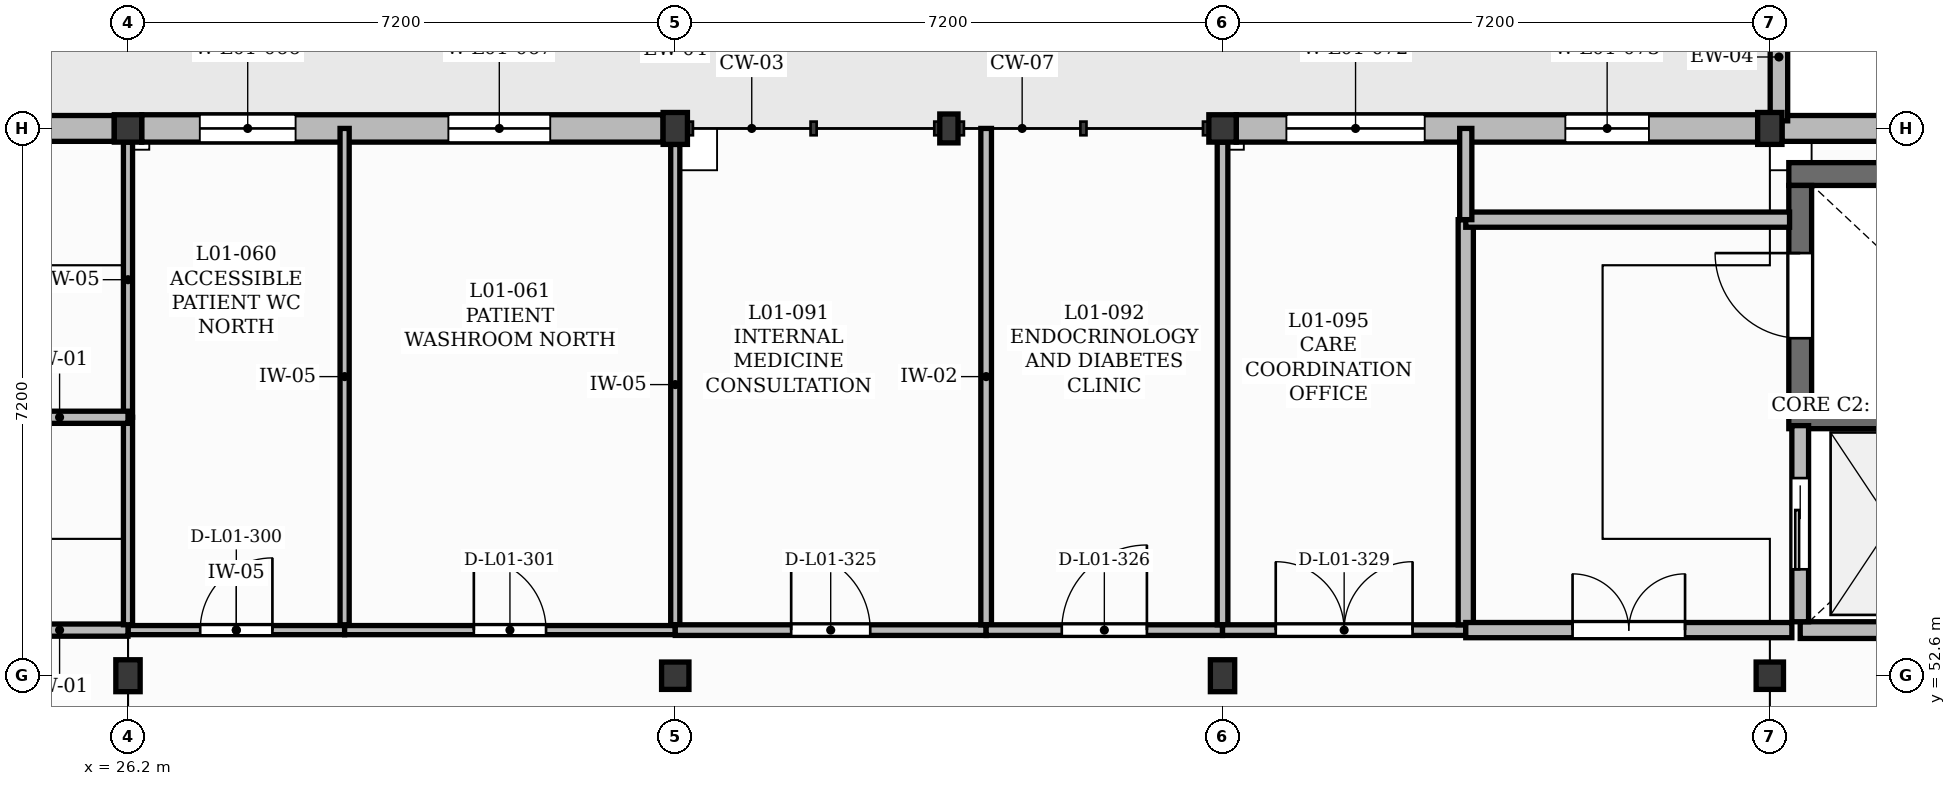
"""IFC4 building model, lengths in metres.
Left out: names, types, materials, properties, quantities, classifications, styles, units other than length and angle.
Written with IfcOpenShell. Run it as: python <this file> out.ifc"""

import sys

from ifc_helpers import new_model, si_unit, direction, frame, frame_2d, origin, origin_2d, place, context, subcontext, project, spatial, rectangle, extrude, element, fill, save


model = new_model("IFC4")
c1 = context("Model", 3, precision=1e-05, world=origin(), true_north=direction((0.0, 1.0)))
c2 = subcontext(c1, "Body", "Model", "MODEL_VIEW")
j1 = project(units=[si_unit("LENGTHUNIT", "METRE"), si_unit("PLANEANGLEUNIT", "RADIAN")], contexts=[c1])
p1 = place(None, origin())
s1 = spatial("IfcSite", under=j1, at=p1, CompositionType="ELEMENT")
p2 = place(p1, origin())
s2 = spatial("IfcBuilding", under=s1, at=p2, CompositionType="ELEMENT")
p3 = place(p2, frame((0.0, 0.0, 4.5)))
s3 = spatial("IfcBuildingStorey", under=s2, at=p3, CompositionType="ELEMENT", Elevation=4.5)
p4 = place(p3, frame((26.2, 52.6, 0.0), z_axis=(0.0, 0.0, 1.0), x_axis=(1.0, 0.0, 0.0)))
e1 = element("IfcColumn", 1, at=p4, inside=s3, PredefinedType="COLUMN", context=c2, shape_type="SweptSolid", body=[
    extrude(rectangle(XDim=0.32, YDim=0.42, at=origin_2d()), origin(), (0.0, 0.0, 1.0), 4.26),
])
for number, where, z_axis, x_axis in (
    (2, (26.2, 59.8, 0.0), (0.0, 0.0, 1.0), (1.0, 0.0, 0.0)),
    (3, (33.4, 52.6, 0.0), (0.0, 0.0, 1.0), (1.0, 0.0, 0.0)),
):
    element("IfcColumn", number, at=place(p3, frame(where, z_axis=z_axis, x_axis=x_axis)), inside=s3, PredefinedType="COLUMN", context=c2, shape_type="SweptSolid", body=[
        extrude(rectangle(XDim=0.36, YDim=0.36, at=origin_2d()), origin(), (0.0, 0.0, 1.0), 4.26),
    ])
for number, where, z_axis, x_axis in (
    (4, (33.4, 59.8, 0.0), (0.0, 0.0, 1.0), (1.0, 0.0, 0.0)),
    (5, (40.6, 52.6, 0.0), (0.0, 0.0, 1.0), (1.0, 0.0, 0.0)),
):
    element("IfcColumn", number, at=place(p3, frame(where, z_axis=z_axis, x_axis=x_axis)), inside=s3, PredefinedType="COLUMN", context=c2, shape_type="SweptSolid", body=[
        extrude(rectangle(XDim=0.32, YDim=0.42, at=origin_2d()), origin(), (0.0, 0.0, 1.0), 4.26),
    ])
for number, where, z_axis, x_axis in (
    (6, (40.6, 59.8, 0.0), (0.0, 0.0, 1.0), (1.0, 0.0, 0.0)),
    (7, (47.8, 52.6, 0.0), (0.0, 0.0, 1.0), (1.0, 0.0, 0.0)),
):
    element("IfcColumn", number, at=place(p3, frame(where, z_axis=z_axis, x_axis=x_axis)), inside=s3, PredefinedType="COLUMN", context=c2, shape_type="SweptSolid", body=[
        extrude(rectangle(XDim=0.36, YDim=0.36, at=origin_2d()), origin(), (0.0, 0.0, 1.0), 4.26),
    ])
p5 = place(p3, frame((47.8, 59.8, 0.0), z_axis=(0.0, 0.0, 1.0), x_axis=(1.0, 0.0, 0.0)))
e8 = element("IfcColumn", 8, at=p5, inside=s3, PredefinedType="COLUMN", context=c2, shape_type="SweptSolid", body=[
    extrude(rectangle(XDim=0.32, YDim=0.42, at=origin_2d()), origin(), (0.0, 0.0, 1.0), 4.26),
])
p6 = place(p3, frame((37.0, 59.8, 0.0), z_axis=(0.0, 0.0, 1.0), x_axis=(1.0, 0.0, 0.0)))
e9 = element("IfcColumn", 9, at=p6, inside=s3, PredefinedType="PILASTER", context=c2, shape_type="SweptSolid", body=[
    extrude(rectangle(XDim=0.24, YDim=0.38, at=origin_2d()), origin(), (0.0, 0.0, 1.0), 4.26),
])
p7 = place(p3, frame((22.72, 59.8, 0.0), z_axis=(0.0, 0.0, 1.0), x_axis=(1.0, 0.0, 0.0)))
e10 = element("IfcWall", 10, at=p7, inside=s3, PredefinedType="SOLIDWALL", context=c2, shape_type="SweptSolid", body=[
    extrude(rectangle(XDim=3.3, YDim=0.34, at=frame_2d((1.65, 0.0))), origin(), (0.0, 0.0, 1.0), 3.8),
])
p8 = place(p7, frame((1.05, 0.0, 1.0)))
e11 = element("IfcOpeningElement", 11, at=p8, cuts=e10, PredefinedType="OPENING", context=c2, shape_type="SweptSolid", body=[
    extrude(rectangle(XDim=1.2, YDim=1.95, at=frame_2d((0.6, 0.975))), frame((0.0, 0.18, 0.0), z_axis=(0.0, -1.0, 0.0), x_axis=(1.0, 0.0, 0.0)), (0.0, 0.0, 1.0), 0.36),
])
p9 = place(p3, frame((26.38, 59.8, 0.0), z_axis=(0.0, 0.0, 1.0), x_axis=(1.0, 0.0, 0.0)))
e12 = element("IfcWall", 12, at=p9, inside=s3, PredefinedType="SOLIDWALL", context=c2, shape_type="SweptSolid", body=[
    extrude(rectangle(XDim=6.86, YDim=0.36, at=frame_2d((3.43, 0.0))), origin(), (0.0, 0.0, 1.0), 3.8),
])
p10 = place(p9, frame((0.765, 0.0, 1.05)))
e13 = element("IfcOpeningElement", 13, at=p10, cuts=e12, PredefinedType="OPENING", context=c2, shape_type="SweptSolid", body=[
    extrude(rectangle(XDim=1.26, YDim=1.65, at=frame_2d((0.63, 0.825))), frame((0.0, 0.19, 0.0), z_axis=(0.0, -1.0, 0.0), x_axis=(1.0, 0.0, 0.0)), (0.0, 0.0, 1.0), 0.38),
])
p11 = place(p9, frame((4.035, 0.0, 1.0)))
e14 = element("IfcOpeningElement", 14, at=p11, cuts=e12, PredefinedType="OPENING", context=c2, shape_type="SweptSolid", body=[
    extrude(rectangle(XDim=1.34, YDim=1.95, at=frame_2d((0.67, 0.975))), frame((0.0, 0.19, 0.0), z_axis=(0.0, -1.0, 0.0), x_axis=(1.0, 0.0, 0.0)), (0.0, 0.0, 1.0), 0.38),
])
p12 = place(p3, frame((40.78, 59.8, 0.0), z_axis=(0.0, 0.0, 1.0), x_axis=(1.0, 0.0, 0.0)))
e15 = element("IfcWall", 15, at=p12, inside=s3, PredefinedType="SOLIDWALL", context=c2, shape_type="SweptSolid", body=[
    extrude(rectangle(XDim=6.86, YDim=0.36, at=frame_2d((3.43, 0.0))), origin(), (0.0, 0.0, 1.0), 3.8),
])
p13 = place(p12, frame((0.66, 0.0, 1.05)))
e16 = element("IfcOpeningElement", 16, at=p13, cuts=e15, PredefinedType="OPENING", context=c2, shape_type="SweptSolid", body=[
    extrude(rectangle(XDim=1.82, YDim=1.65, at=frame_2d((0.91, 0.825))), frame((0.0, 0.19, 0.0), z_axis=(0.0, -1.0, 0.0), x_axis=(1.0, 0.0, 0.0)), (0.0, 0.0, 1.0), 0.38),
])
p14 = place(p12, frame((4.33, 0.0, 1.0)))
e17 = element("IfcOpeningElement", 17, at=p14, cuts=e15, PredefinedType="OPENING", context=c2, shape_type="SweptSolid", body=[
    extrude(rectangle(XDim=1.1, YDim=1.8, at=frame_2d((0.55, 0.9))), frame((0.0, 0.19, 0.0), z_axis=(0.0, -1.0, 0.0), x_axis=(1.0, 0.0, 0.0)), (0.0, 0.0, 1.0), 0.38),
])
p15 = place(p3, frame((47.96, 59.8, 0.0), z_axis=(0.0, 0.0, 1.0), x_axis=(1.0, 0.0, 0.0)))
e18 = element("IfcWall", 18, at=p15, inside=s3, PredefinedType="SOLIDWALL", context=c2, shape_type="SweptSolid", body=[
    extrude(rectangle(XDim=3.32, YDim=0.34, at=frame_2d((1.66, 0.0))), origin(), (0.0, 0.0, 1.0), 3.8),
])
p16 = place(p3, frame((47.92, 59.9, -0.05), z_axis=(0.0, 0.0, 1.0), x_axis=(0.0, 1.0, 0.0)))
e19 = element("IfcWall", 19, at=p16, inside=s3, PredefinedType="PARAPET", context=c2, shape_type="SweptSolid", body=[
    extrude(rectangle(XDim=1.68, YDim=0.23, at=frame_2d((0.84, 0.0))), origin(), (0.0, 0.0, 1.0), 0.8),
])
for number, where, z_axis, x_axis in (
    (20, (48.05, 56.0, 0.0), (0.0, 0.0, 1.0), (1.0, 0.0, 0.0)),
    (21, (48.05, 59.2, 0.0), (0.0, 0.0, 1.0), (1.0, 0.0, 0.0)),
):
    element("IfcWall", number, at=place(p3, frame(where, z_axis=z_axis, x_axis=x_axis)), inside=s3, PredefinedType="SHEAR", context=c2, shape_type="SweptSolid", body=[
        extrude(rectangle(XDim=6.7, YDim=0.3, at=frame_2d((3.35, 0.0))), origin(), (0.0, 0.0, 1.0), 4.25),
    ])
p17 = place(p3, frame((48.2, 56.15, 0.0), z_axis=(0.0, 0.0, 1.0), x_axis=(0.0, 1.0, 0.0)))
e22 = element("IfcWall", 22, at=p17, inside=s3, PredefinedType="SHEAR", context=c2, shape_type="SweptSolid", body=[
    extrude(rectangle(XDim=2.9, YDim=0.3, at=frame_2d((1.45, 0.0))), origin(), (0.0, 0.0, 1.0), 4.25),
])
p18 = place(p17, frame((0.89, 0.0, 0.0)))
e23 = element("IfcOpeningElement", 23, at=p18, cuts=e22, PredefinedType="OPENING", context=c2, shape_type="SweptSolid", body=[
    extrude(rectangle(XDim=1.12, YDim=2.1, at=frame_2d((0.56, 1.05))), frame((0.0, 0.16, 0.0), z_axis=(0.0, -1.0, 0.0), x_axis=(1.0, 0.0, 0.0)), (0.0, 0.0, 1.0), 0.32),
])
p19 = place(p3, frame((48.2, 53.2, 0.0), z_axis=(0.0, 0.0, 1.0), x_axis=(1.0, 0.0, 0.0)))
e24 = element("IfcWall", 24, at=p19, inside=s3, PredefinedType="SOLIDWALL", context=c2, shape_type="SweptSolid", body=[
    extrude(rectangle(XDim=2.4, YDim=0.22, at=frame_2d((1.2, 0.0))), origin(), (0.0, 0.0, 1.0), 4.25),
])
p20 = place(p3, frame((48.2, 53.31, 0.0), z_axis=(0.0, 0.0, 1.0), x_axis=(0.0, 1.0, 0.0)))
e25 = element("IfcWall", 25, at=p20, inside=s3, PredefinedType="SOLIDWALL", context=c2, shape_type="SweptSolid", body=[
    extrude(rectangle(XDim=2.58, YDim=0.22, at=frame_2d((1.29, 0.0))), origin(), (0.0, 0.0, 1.0), 4.25),
])
p21 = place(p20, frame((0.69, 0.0, 0.0)))
e26 = element("IfcOpeningElement", 26, at=p21, cuts=e25, PredefinedType="OPENING", context=c2, shape_type="SweptSolid", body=[
    extrude(rectangle(XDim=1.2, YDim=2.15, at=frame_2d((0.6, 1.075))), frame((0.0, 0.12, 0.0), z_axis=(0.0, -1.0, 0.0), x_axis=(1.0, 0.0, 0.0)), (0.0, 0.0, 1.0), 0.24),
])
p22 = place(p3, frame((26.2, 53.2, 0.0), z_axis=(0.0, 0.0, 1.0), x_axis=(1.0, 0.0, 0.0)))
e27 = element("IfcWall", 27, at=p22, inside=s3, PredefinedType="PLUMBINGWALL", context=c2, shape_type="SweptSolid", body=[
    extrude(rectangle(XDim=2.85, YDim=0.12, at=frame_2d((1.425, 0.0))), origin(), (0.0, 0.0, 1.0), 4.18),
])
p23 = place(p22, frame((0.95, 0.0, 0.0)))
e28 = element("IfcOpeningElement", 28, at=p23, cuts=e27, PredefinedType="OPENING", context=c2, shape_type="SweptSolid", body=[
    extrude(rectangle(XDim=0.95, YDim=2.1, at=frame_2d((0.475, 1.05))), frame((0.0, 0.07, 0.0), z_axis=(0.0, -1.0, 0.0), x_axis=(1.0, 0.0, 0.0)), (0.0, 0.0, 1.0), 0.14),
])
p24 = place(p3, frame((26.2, 56.0, 0.0), z_axis=(0.0, 0.0, 1.0), x_axis=(0.0, 1.0, 0.0)))
e29 = element("IfcWall", 29, at=p24, inside=s3, PredefinedType="PLUMBINGWALL", context=c2, shape_type="SweptSolid", body=[
    extrude(rectangle(XDim=3.62, YDim=0.12, at=frame_2d((1.81, 0.0))), origin(), (0.0, 0.0, 1.0), 3.74),
])
p25 = place(p3, frame((29.05, 53.27, 0.0), z_axis=(0.0, 0.0, 1.0), x_axis=(0.0, 1.0, 0.0)))
e30 = element("IfcWall", 30, at=p25, inside=s3, PredefinedType="PLUMBINGWALL", context=c2, shape_type="SweptSolid", body=[
    extrude(rectangle(XDim=6.53, YDim=0.12, at=frame_2d((3.265, 0.0))), origin(), (0.0, 0.0, 1.0), 4.18),
])
p26 = place(p3, frame((29.05, 53.2, 0.0), z_axis=(0.0, 0.0, 1.0), x_axis=(1.0, 0.0, 0.0)))
e31 = element("IfcWall", 31, at=p26, inside=s3, PredefinedType="PLUMBINGWALL", context=c2, shape_type="SweptSolid", body=[
    extrude(rectangle(XDim=4.35, YDim=0.12, at=frame_2d((2.175, 0.0))), origin(), (0.0, 0.0, 1.0), 4.18),
])
p27 = place(p26, frame((1.7, 0.0, 0.0)))
e32 = element("IfcOpeningElement", 32, at=p27, cuts=e31, PredefinedType="OPENING", context=c2, shape_type="SweptSolid", body=[
    extrude(rectangle(XDim=0.95, YDim=2.1, at=frame_2d((0.475, 1.05))), frame((0.0, 0.07, 0.0), z_axis=(0.0, -1.0, 0.0), x_axis=(1.0, 0.0, 0.0)), (0.0, 0.0, 1.0), 0.14),
])
p28 = place(p3, frame((33.4, 53.27, 0.0), z_axis=(0.0, 0.0, 1.0), x_axis=(0.0, 1.0, 0.0)))
e33 = element("IfcWall", 33, at=p28, inside=s3, PredefinedType="PLUMBINGWALL", context=c2, shape_type="SweptSolid", body=[
    extrude(rectangle(XDim=6.32, YDim=0.12, at=frame_2d((3.16, 0.0))), origin(), (0.0, 0.0, 1.0), 3.74),
])
p29 = place(p3, frame((33.4, 53.2, 0.0), z_axis=(0.0, 0.0, 1.0), x_axis=(1.0, 0.0, 0.0)))
e34 = element("IfcWall", 34, at=p29, inside=s3, PredefinedType="PARTITIONING", context=c2, shape_type="SweptSolid", body=[
    extrude(rectangle(XDim=4.09, YDim=0.14, at=frame_2d((2.045, 0.0))), origin(), (0.0, 0.0, 1.0), 4.18),
])
p30 = place(p29, frame((1.525, 0.0, 0.0)))
e35 = element("IfcOpeningElement", 35, at=p30, cuts=e34, PredefinedType="OPENING", context=c2, shape_type="SweptSolid", body=[
    extrude(rectangle(XDim=1.04, YDim=2.1, at=frame_2d((0.52, 1.05))), frame((0.0, 0.08, 0.0), z_axis=(0.0, -1.0, 0.0), x_axis=(1.0, 0.0, 0.0)), (0.0, 0.0, 1.0), 0.16),
])
p31 = place(p3, frame((37.49, 53.27, 0.0), z_axis=(0.0, 0.0, 1.0), x_axis=(0.0, 1.0, 0.0)))
e36 = element("IfcWall", 36, at=p31, inside=s3, PredefinedType="PARTITIONING", context=c2, shape_type="SweptSolid", body=[
    extrude(rectangle(XDim=6.53, YDim=0.14, at=frame_2d((3.265, 0.0))), origin(), (0.0, 0.0, 1.0), 4.18),
])
p32 = place(p3, frame((37.49, 53.2, 0.0), z_axis=(0.0, 0.0, 1.0), x_axis=(1.0, 0.0, 0.0)))
e37 = element("IfcWall", 37, at=p32, inside=s3, PredefinedType="PARTITIONING", context=c2, shape_type="SweptSolid", body=[
    extrude(rectangle(XDim=3.11, YDim=0.14, at=frame_2d((1.555, 0.0))), origin(), (0.0, 0.0, 1.0), 4.18),
])
p33 = place(p32, frame((0.995, 0.0, 0.0)))
e38 = element("IfcOpeningElement", 38, at=p33, cuts=e37, PredefinedType="OPENING", context=c2, shape_type="SweptSolid", body=[
    extrude(rectangle(XDim=1.12, YDim=2.15, at=frame_2d((0.56, 1.075))), frame((0.0, 0.08, 0.0), z_axis=(0.0, -1.0, 0.0), x_axis=(1.0, 0.0, 0.0)), (0.0, 0.0, 1.0), 0.16),
])
p34 = place(p3, frame((40.6, 53.27, 0.0), z_axis=(0.0, 0.0, 1.0), x_axis=(0.0, 1.0, 0.0)))
e39 = element("IfcWall", 39, at=p34, inside=s3, PredefinedType="PARTITIONING", context=c2, shape_type="SweptSolid", body=[
    extrude(rectangle(XDim=6.35, YDim=0.14, at=frame_2d((3.175, 0.0))), origin(), (0.0, 0.0, 1.0), 3.74),
])
p35 = place(p3, frame((40.6, 53.2, 0.0), z_axis=(0.0, 0.0, 1.0), x_axis=(1.0, 0.0, 0.0)))
e40 = element("IfcWall", 40, at=p35, inside=s3, PredefinedType="PARTITIONING", context=c2, shape_type="SweptSolid", body=[
    extrude(rectangle(XDim=3.2, YDim=0.14, at=frame_2d((1.6, 0.0))), origin(), (0.0, 0.0, 1.0), 4.18),
])
p36 = place(p35, frame((0.7, 0.0, 0.0)))
e41 = element("IfcOpeningElement", 41, at=p36, cuts=e40, PredefinedType="OPENING", context=c2, shape_type="SweptSolid", body=[
    extrude(rectangle(XDim=1.8, YDim=2.3, at=frame_2d((0.9, 1.15))), frame((0.0, 0.08, 0.0), z_axis=(0.0, -1.0, 0.0), x_axis=(1.0, 0.0, 0.0)), (0.0, 0.0, 1.0), 0.16),
])
p37 = place(p3, frame((43.8, 53.27, 0.0), z_axis=(0.0, 0.0, 1.0), x_axis=(0.0, 1.0, 0.0)))
e42 = element("IfcWall", 42, at=p37, inside=s3, PredefinedType="PARTITIONING", context=c2, shape_type="SweptSolid", body=[
    extrude(rectangle(XDim=5.33, YDim=0.2, at=frame_2d((2.665, 0.0))), origin(), (0.0, 0.0, 1.0), 4.18),
])
p38 = place(p3, frame((43.8, 53.2, 0.0), z_axis=(0.0, 0.0, 1.0), x_axis=(1.0, 0.0, 0.0)))
e43 = element("IfcWall", 43, at=p38, inside=s3, PredefinedType="PARTITIONING", context=c2, shape_type="SweptSolid", body=[
    extrude(rectangle(XDim=4.29, YDim=0.2, at=frame_2d((2.145, 0.0))), origin(), (0.0, 0.0, 1.0), 4.18),
])
p39 = place(p38, frame((1.405, 0.0, 0.0)))
e44 = element("IfcOpeningElement", 44, at=p39, cuts=e43, PredefinedType="OPENING", context=c2, shape_type="SweptSolid", body=[
    extrude(rectangle(XDim=1.48, YDim=2.25, at=frame_2d((0.74, 1.125))), frame((0.0, 0.11, 0.0), z_axis=(0.0, -1.0, 0.0), x_axis=(1.0, 0.0, 0.0)), (0.0, 0.0, 1.0), 0.22),
])
p40 = place(p3, frame((48.06, 58.6, 0.0), z_axis=(0.0, 0.0, 1.0), x_axis=(-1.0, 0.0, 0.0)))
e45 = element("IfcWall", 45, at=p40, inside=s3, PredefinedType="PARTITIONING", context=c2, shape_type="SweptSolid", body=[
    extrude(rectangle(XDim=4.26, YDim=0.2, at=frame_2d((2.13, 0.0))), origin(), (0.0, 0.0, 1.0), 4.18),
])
p41 = place(p3, frame((26.2, 53.2, 0.0), z_axis=(0.0, 0.0, 1.0), x_axis=(-1.0, 0.0, 0.0)))
e46 = element("IfcWall", 46, at=p41, inside=s3, PredefinedType="PARTITIONING", context=c2, shape_type="SweptSolid", body=[
    extrude(rectangle(XDim=1.8, YDim=0.16, at=frame_2d((0.9, 0.0))), origin(), (0.0, 0.0, 1.0), 4.18),
])
p42 = place(p3, frame((26.2, 53.27, 0.0), z_axis=(0.0, 0.0, 1.0), x_axis=(0.0, 1.0, 0.0)))
e47 = element("IfcWall", 47, at=p42, inside=s3, PredefinedType="PLUMBINGWALL", context=c2, shape_type="SweptSolid", body=[
    extrude(rectangle(XDim=2.73, YDim=0.12, at=frame_2d((1.365, 0.0))), origin(), (0.0, 0.0, 1.0), 3.74),
])
p43 = place(p3, frame((24.4, 56.0, 0.0), z_axis=(0.0, 0.0, 1.0), x_axis=(1.0, 0.0, 0.0)))
e48 = element("IfcWall", 48, at=p43, inside=s3, PredefinedType="PARTITIONING", context=c2, shape_type="SweptSolid", body=[
    extrude(rectangle(XDim=1.8, YDim=0.16, at=frame_2d((0.9, 0.0))), origin(), (0.0, 0.0, 1.0), 4.18),
])
p44 = place(p3, frame((43.8, 58.6, 0.0), z_axis=(0.0, 0.0, 1.0), x_axis=(0.0, 1.0, 0.0)))
e49 = element("IfcWall", 49, at=p44, inside=s3, PredefinedType="PARTITIONING", context=c2, shape_type="SweptSolid", body=[
    extrude(rectangle(XDim=1.2, YDim=0.16, at=frame_2d((0.6, 0.0))), origin(), (0.0, 0.0, 1.0), 4.18),
])
p45 = place(p10, origin())
e50 = element("IfcWindow", 50, at=p45, inside=s3, PartitioningType="SINGLE_PANEL", PredefinedType="WINDOW", context=c2, shape_type="SweptSolid", body=[
    extrude(rectangle(XDim=1.26, YDim=1.65, at=frame_2d((0.63, 0.825))), frame((0.0, 0.03, 0.0), z_axis=(0.0, -1.0, 0.0), x_axis=(1.0, 0.0, 0.0)), (0.0, 0.0, 1.0), 0.06),
])
fill(e13, e50)
p46 = place(p11, origin())
e51 = element("IfcWindow", 51, at=p46, inside=s3, PartitioningType="SINGLE_PANEL", PredefinedType="WINDOW", context=c2, shape_type="SweptSolid", body=[
    extrude(rectangle(XDim=1.34, YDim=1.95, at=frame_2d((0.67, 0.975))), frame((0.0, 0.03, 0.0), z_axis=(0.0, -1.0, 0.0), x_axis=(1.0, 0.0, 0.0)), (0.0, 0.0, 1.0), 0.06),
])
fill(e14, e51)
p47 = place(p13, origin())
e52 = element("IfcWindow", 52, at=p47, inside=s3, PartitioningType="DOUBLE_PANEL_VERTICAL", PredefinedType="WINDOW", context=c2, shape_type="SweptSolid", body=[
    extrude(rectangle(XDim=1.82, YDim=1.65, at=frame_2d((0.91, 0.825))), frame((0.0, 0.03, 0.0), z_axis=(0.0, -1.0, 0.0), x_axis=(1.0, 0.0, 0.0)), (0.0, 0.0, 1.0), 0.06),
])
fill(e16, e52)
p48 = place(p14, origin())
e53 = element("IfcWindow", 53, at=p48, inside=s3, PartitioningType="SINGLE_PANEL", PredefinedType="WINDOW", context=c2, shape_type="SweptSolid", body=[
    extrude(rectangle(XDim=1.1, YDim=1.8, at=frame_2d((0.55, 0.9))), frame((0.0, 0.03, 0.0), z_axis=(0.0, -1.0, 0.0), x_axis=(1.0, 0.0, 0.0)), (0.0, 0.0, 1.0), 0.06),
])
fill(e17, e53)
p49 = place(p21, origin())
e54 = element("IfcDoor", 54, at=p49, inside=s3, OperationType="SLIDING_TO_LEFT", PredefinedType="DOOR", context=c2, shape_type="SweptSolid", body=[
    extrude(rectangle(XDim=1.2, YDim=2.15, at=frame_2d((0.6, 1.075))), frame((0.0, 0.025, 0.0), z_axis=(0.0, -1.0, 0.0), x_axis=(1.0, 0.0, 0.0)), (0.0, 0.0, 1.0), 0.05),
])
fill(e26, e54)
p50 = place(p18, origin())
e55 = element("IfcDoor", 55, at=p50, inside=s3, OperationType="SINGLE_SWING_RIGHT", PredefinedType="DOOR", context=c2, shape_type="SweptSolid", body=[
    extrude(rectangle(XDim=1.12, YDim=2.1, at=frame_2d((0.56, 1.05))), frame((0.0, 0.025, 0.0), z_axis=(0.0, -1.0, 0.0), x_axis=(1.0, 0.0, 0.0)), (0.0, 0.0, 1.0), 0.05),
])
fill(e23, e55)
p51 = place(p39, origin())
e56 = element("IfcDoor", 56, at=p51, inside=s3, OperationType="DOUBLE_DOOR_SINGLE_SWING", PredefinedType="DOOR", context=c2, shape_type="SweptSolid", body=[
    extrude(rectangle(XDim=1.48, YDim=2.25, at=frame_2d((0.74, 1.125))), frame((0.0, 0.025, 0.0), z_axis=(0.0, -1.0, 0.0), x_axis=(1.0, 0.0, 0.0)), (0.0, 0.0, 1.0), 0.05),
])
fill(e44, e56)
p52 = place(p23, origin())
e57 = element("IfcDoor", 57, at=p52, inside=s3, OperationType="SINGLE_SWING_RIGHT", PredefinedType="DOOR", context=c2, shape_type="SweptSolid", body=[
    extrude(rectangle(XDim=0.95, YDim=2.1, at=frame_2d((0.475, 1.05))), frame((0.0, 0.025, 0.0), z_axis=(0.0, -1.0, 0.0), x_axis=(1.0, 0.0, 0.0)), (0.0, 0.0, 1.0), 0.05),
])
fill(e28, e57)
p53 = place(p27, origin())
e58 = element("IfcDoor", 58, at=p53, inside=s3, OperationType="SINGLE_SWING_LEFT", PredefinedType="DOOR", context=c2, shape_type="SweptSolid", body=[
    extrude(rectangle(XDim=0.95, YDim=2.1, at=frame_2d((0.475, 1.05))), frame((0.0, 0.025, 0.0), z_axis=(0.0, -1.0, 0.0), x_axis=(1.0, 0.0, 0.0)), (0.0, 0.0, 1.0), 0.05),
])
fill(e32, e58)
p54 = place(p30, origin())
e59 = element("IfcDoor", 59, at=p54, inside=s3, OperationType="SINGLE_SWING_LEFT", PredefinedType="DOOR", context=c2, shape_type="SweptSolid", body=[
    extrude(rectangle(XDim=1.04, YDim=2.1, at=frame_2d((0.52, 1.05))), frame((0.0, 0.025, 0.0), z_axis=(0.0, -1.0, 0.0), x_axis=(1.0, 0.0, 0.0)), (0.0, 0.0, 1.0), 0.05),
])
fill(e35, e59)
p55 = place(p33, origin())
e60 = element("IfcDoor", 60, at=p55, inside=s3, OperationType="SINGLE_SWING_RIGHT", PredefinedType="DOOR", context=c2, shape_type="SweptSolid", body=[
    extrude(rectangle(XDim=1.12, YDim=2.15, at=frame_2d((0.56, 1.075))), frame((0.0, 0.025, 0.0), z_axis=(0.0, -1.0, 0.0), x_axis=(1.0, 0.0, 0.0)), (0.0, 0.0, 1.0), 0.05),
])
fill(e38, e60)
p56 = place(p36, origin())
e61 = element("IfcDoor", 61, at=p56, inside=s3, OperationType="DOUBLE_DOOR_SINGLE_SWING", PredefinedType="DOOR", context=c2, shape_type="SweptSolid", body=[
    extrude(rectangle(XDim=1.8, YDim=2.3, at=frame_2d((0.9, 1.15))), frame((0.0, 0.025, 0.0), z_axis=(0.0, -1.0, 0.0), x_axis=(1.0, 0.0, 0.0)), (0.0, 0.0, 1.0), 0.05),
])
fill(e41, e61)
save(model, sys.argv[1])
